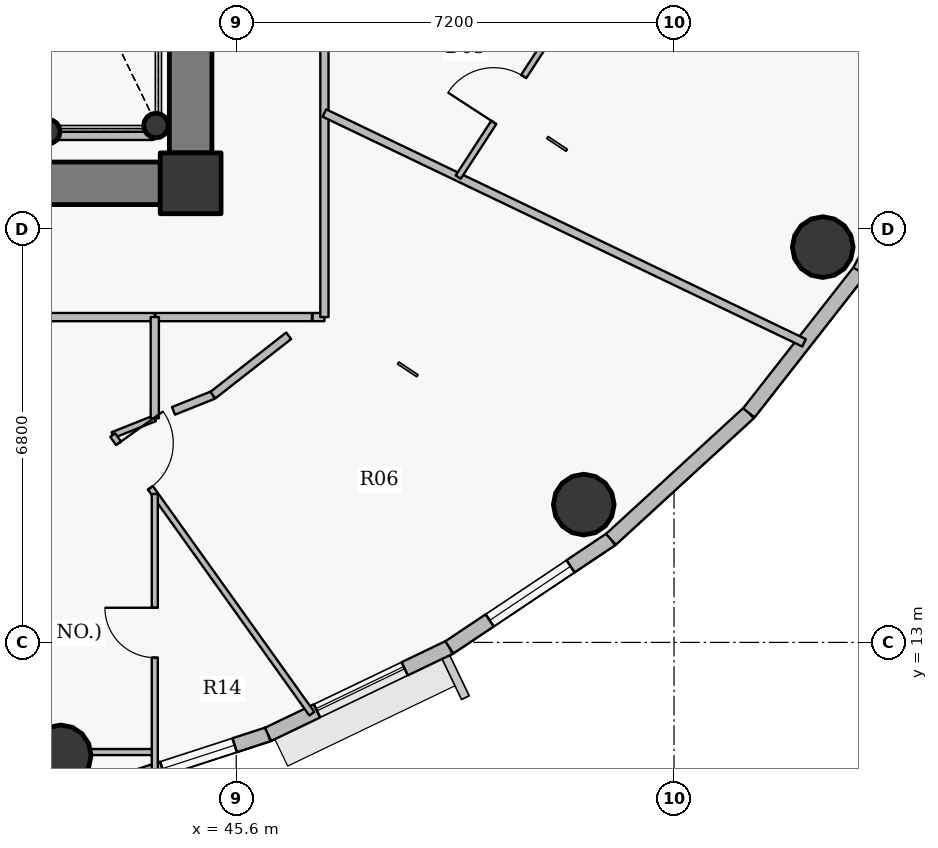
"""IFC4 building model, lengths in metres.
Left out: names, types, materials, properties, quantities, classifications, styles, units other than length and angle.
Written with IfcOpenShell. Run it as: python <this file> out.ifc"""

import sys

from ifc_helpers import new_model, si_unit, direction, frame, frame_2d, origin, origin_2d, place, context, subcontext, project, spatial, rectangle, hollow_circle, extrude, source, transform, mapped, element, fill, save


model = new_model("IFC4")
c1 = context("Model", 3, precision=1e-05, world=origin(), true_north=direction((0.0, 1.0)))
c2 = subcontext(c1, "Body", "Model", "MODEL_VIEW")
j1 = project(units=[si_unit("LENGTHUNIT", "METRE"), si_unit("PLANEANGLEUNIT", "RADIAN")], contexts=[c1])
p1 = place(None, origin())
s1 = spatial("IfcSite", under=j1, at=p1, CompositionType="ELEMENT")
p2 = place(p1, origin())
s2 = spatial("IfcBuilding", under=s1, at=p2, CompositionType="ELEMENT")
p3 = place(p2, frame((0.0, 0.0, 310.5)))
s3 = spatial("IfcBuildingStorey", under=s2, at=p3, CompositionType="ELEMENT", Elevation=310.5)
p4 = place(p3, frame((44.85, 20.55, 0.0), z_axis=(0.0, 0.0, 1.0), x_axis=(1.0, 0.0, 0.0)))
e1 = element("IfcColumn", 1, at=p4, inside=s3, PredefinedType="COLUMN", context=c2, shape_type="SweptSolid", body=[
    extrude(rectangle(XDim=1.0, YDim=1.0, at=origin_2d()), origin(), (0.0, 0.0, 1.0), 3.75),
])
for number, where, z_axis, x_axis in (
    (2, (44.28, 21.5, 0.0), (0.0, 0.0, 1.0), (1.0, 0.0, 0.0)),
    (3, (42.5, 21.4, 0.0), (0.0, 0.0, 1.0), (1.0, 0.0, 0.0)),
):
    element("IfcColumn", number, at=place(p3, frame(where, z_axis=z_axis, x_axis=x_axis)), inside=s3, PredefinedType="COLUMN", context=c2, shape_type="SweptSolid", body=[
        extrude(hollow_circle(Radius=0.203, WallThickness=0.016, at=origin_2d()), origin(), (0.0, 0.0, 1.0), 3.75),
    ])
p5 = place(p3, frame((44.85, 32.95, 0.0), z_axis=(0.0, 0.0, 1.0), x_axis=(0.0, -1.0, 0.0)))
e4 = element("IfcWall", 4, at=p5, inside=s3, PredefinedType="SHEAR", context=c2, shape_type="SweptSolid", body=[
    extrude(rectangle(XDim=11.9, YDim=0.7, at=frame_2d((5.95, 0.0))), origin(), (0.0, 0.0, 1.0), 3.05),
])
p6 = place(p3, frame((44.35, 20.55, 0.0), z_axis=(0.0, 0.0, 1.0), x_axis=(-1.0, 0.0, 0.0)))
e5 = element("IfcWall", 5, at=p6, inside=s3, PredefinedType="SHEAR", context=c2, shape_type="SweptSolid", body=[
    extrude(rectangle(XDim=16.7, YDim=0.7, at=frame_2d((8.35, 0.0))), origin(), (0.0, 0.0, 1.0), 3.05),
])
p7 = place(p6, frame((12.925, 0.0, 0.0)))
e6 = element("IfcOpeningElement", 6, at=p7, cuts=e5, PredefinedType="OPENING", context=c2, shape_type="SweptSolid", body=[
    extrude(rectangle(XDim=1.15, YDim=2.15, at=origin_2d()), frame((0.575, 0.36, 1.075), z_axis=(0.0, -1.0, 0.0), x_axis=(1.0, 0.0, 0.0)), (0.0, 0.0, 1.0), 0.72),
])
p8 = place(p6, frame((9.1, 0.0, 0.0)))
e7 = element("IfcOpeningElement", 7, at=p8, cuts=e5, PredefinedType="OPENING", context=c2, shape_type="SweptSolid", body=[
    extrude(rectangle(XDim=1.15, YDim=2.15, at=origin_2d()), frame((0.575, 0.36, 1.075), z_axis=(0.0, -1.0, 0.0), x_axis=(1.0, 0.0, 0.0)), (0.0, 0.0, 1.0), 0.72),
])
for number, where, z_axis, x_axis in (
    (8, (42.712, 11.142, 0.0), (0.0, 0.0, 1.0), (1.0, 0.0, 0.0)),
    (9, (51.315, 15.267, 0.0), (0.0, 0.0, 1.0), (1.0, 0.0, 0.0)),
    (10, (55.246, 19.5, 0.0), (0.0, 0.0, 1.0), (1.0, 0.0, 0.0)),
):
    element("IfcColumn", number, at=place(p3, frame(where, z_axis=z_axis, x_axis=x_axis)), inside=s3, PredefinedType="COLUMN", context=c2, shape_type="SweptSolid", body=[
        extrude(hollow_circle(Radius=0.5, WallThickness=0.032, at=origin_2d()), origin(), (0.0, 0.0, 1.0), 3.75),
    ])
p9 = place(p3, frame((46.123, 11.488, 0.0), z_axis=(0.0, 0.0, 1.0), x_axis=(-0.95123136723, -0.308478339592, 0.0)))
e11 = element("IfcWall", 11, at=p9, inside=s3, PredefinedType="SOLIDWALL", context=c2, shape_type="SweptSolid", body=[
    extrude(rectangle(XDim=3.398, YDim=0.24, at=frame_2d((1.699, 0.0))), origin(), (0.0, 0.0, 1.0), 3.5),
])
p10 = place(p9, frame((0.577, 0.0, 0.9)))
e12 = element("IfcOpeningElement", 12, at=p10, cuts=e11, PredefinedType="OPENING", context=c2, shape_type="SweptSolid", body=[
    extrude(rectangle(XDim=1.25, YDim=1.65, at=origin_2d()), frame((0.625, 0.13, 0.825), z_axis=(0.0, -1.0, 0.0), x_axis=(1.0, 0.0, 0.0)), (0.0, 0.0, 1.0), 0.26),
])
p11 = place(p3, frame((49.104, 12.918, 0.0), z_axis=(0.0, 0.0, 1.0), x_axis=(-0.901573741254, -0.43262546051, 0.0)))
e13 = element("IfcWall", 13, at=p11, inside=s3, PredefinedType="SOLIDWALL", context=c2, shape_type="SweptSolid", body=[
    extrude(rectangle(XDim=3.307, YDim=0.24, at=frame_2d((1.653, 0.0))), origin(), (0.0, 0.0, 1.0), 3.5),
])
p12 = place(p11, frame((0.814, 0.0, 0.9)))
e14 = element("IfcOpeningElement", 14, at=p12, cuts=e13, PredefinedType="OPENING", context=c2, shape_type="SweptSolid", body=[
    extrude(rectangle(XDim=1.6, YDim=1.75, at=origin_2d()), frame((0.8, 0.13, 0.875), z_axis=(0.0, -1.0, 0.0), x_axis=(1.0, 0.0, 0.0)), (0.0, 0.0, 1.0), 0.26),
])
p13 = place(p3, frame((51.762, 14.696, 0.0), z_axis=(0.0, 0.0, 1.0), x_axis=(-0.831250592635, -0.55589787933, 0.0)))
e15 = element("IfcWall", 15, at=p13, inside=s3, PredefinedType="SOLIDWALL", context=c2, shape_type="SweptSolid", body=[
    extrude(rectangle(XDim=3.197, YDim=0.24, at=frame_2d((1.599, 0.0))), origin(), (0.0, 0.0, 1.0), 3.5),
])
p14 = place(p13, frame((0.799, 0.0, 0.9)))
e16 = element("IfcOpeningElement", 16, at=p14, cuts=e15, PredefinedType="OPENING", context=c2, shape_type="SweptSolid", body=[
    extrude(rectangle(XDim=1.6, YDim=1.75, at=origin_2d()), frame((0.8, 0.13, 0.875), z_axis=(0.0, -1.0, 0.0), x_axis=(1.0, 0.0, 0.0)), (0.0, 0.0, 1.0), 0.26),
])
p15 = place(p3, frame((54.03, 16.775, 0.0), z_axis=(0.0, 0.0, 1.0), x_axis=(-0.737068506972, -0.675818034703, 0.0)))
e17 = element("IfcWall", 17, at=p15, inside=s3, PredefinedType="SOLIDWALL", context=c2, shape_type="SweptSolid", body=[
    extrude(rectangle(XDim=3.077, YDim=0.24, at=frame_2d((1.539, 0.0))), origin(), (0.0, 0.0, 1.0), 3.5),
])
p16 = place(p3, frame((55.854, 19.105, 0.0), z_axis=(0.0, 0.0, 1.0), x_axis=(-0.616337186556, -0.787482363275, 0.0)))
e18 = element("IfcWall", 18, at=p16, inside=s3, PredefinedType="SOLIDWALL", context=c2, shape_type="SweptSolid", body=[
    extrude(rectangle(XDim=2.958, YDim=0.24, at=frame_2d((1.479, 0.0))), origin(), (0.0, 0.0, 1.0), 3.5),
])
p17 = place(p3, frame((57.188, 21.628, 0.0), z_axis=(0.0, 0.0, 1.0), x_axis=(-0.467628269026, -0.883925224218, 0.0)))
e19 = element("IfcWall", 19, at=p17, inside=s3, PredefinedType="SOLIDWALL", context=c2, shape_type="SweptSolid", body=[
    extrude(rectangle(XDim=2.854, YDim=0.24, at=frame_2d((1.427, 0.0))), origin(), (0.0, 0.0, 1.0), 3.5),
])
p18 = place(p3, frame((24.95, 18.35, 0.0), z_axis=(0.0, 0.0, 1.0), x_axis=(1.0, 0.0, 0.0)))
e20 = element("IfcWall", 20, at=p18, inside=s3, PredefinedType="PARTITIONING", context=c2, shape_type="SweptSolid", body=[
    extrude(rectangle(XDim=19.311, YDim=0.135, at=frame_2d((9.655, 0.0))), origin(), (0.0, 0.0, 1.0), 3.035),
])
p19 = place(p18, frame((9.319, 0.0, 0.0)))
e21 = element("IfcOpeningElement", 21, at=p19, cuts=e20, PredefinedType="OPENING", context=c2, shape_type="SweptSolid", body=[
    extrude(rectangle(XDim=1.0, YDim=2.15, at=origin_2d()), frame((0.5, 0.078, 1.075), z_axis=(0.0, -1.0, 0.0), x_axis=(1.0, 0.0, 0.0)), (0.0, 0.0, 1.0), 0.155),
])
p20 = place(p3, frame((37.857, 11.197, 0.0), z_axis=(0.0, 0.0, 1.0), x_axis=(1.0, 0.0, 0.0)))
e22 = element("IfcWall", 22, at=p20, inside=s3, PredefinedType="PARTITIONING", context=c2, shape_type="SweptSolid", body=[
    extrude(rectangle(XDim=6.404, YDim=0.1, at=frame_2d((3.202, 0.0))), origin(), (0.0, 0.0, 1.0), 2.985),
])
p21 = place(p20, frame((1.962, 0.0, 0.0)))
e23 = element("IfcOpeningElement", 23, at=p21, cuts=e22, PredefinedType="OPENING", context=c2, shape_type="SweptSolid", body=[
    extrude(rectangle(XDim=0.9, YDim=2.1, at=origin_2d()), frame((0.45, 0.06, 1.05), z_axis=(0.0, -1.0, 0.0), x_axis=(1.0, 0.0, 0.0)), (0.0, 0.0, 1.0), 0.12),
])
p22 = place(p3, frame((43.568, 16.409, 0.0), z_axis=(0.0, 0.0, 1.0), x_axis=(0.928815226083, 0.370543217178, 0.0)))
e24 = element("IfcWall", 24, at=p22, inside=s3, PredefinedType="PARTITIONING", context=c2, shape_type="SweptSolid", body=[
    extrude(rectangle(XDim=0.745, YDim=0.1, at=frame_2d((0.373, 0.0))), origin(), (0.0, 0.0, 1.0), 3.5),
])
p23 = place(p3, frame((43.568, 16.409, 0.0), z_axis=(0.0, 0.0, 1.0), x_axis=(0.581447306737, -0.81358406418, 0.0)))
e25 = element("IfcWall", 25, at=p23, inside=s3, PredefinedType="PARTITIONING", context=c2, shape_type="SweptSolid", body=[
    extrude(rectangle(XDim=5.632, YDim=0.1, at=frame_2d((2.816, 0.0))), origin(), (0.0, 0.0, 1.0), 2.985),
])
p24 = place(p23, frame((0.165, 0.0, 0.0)))
e26 = element("IfcOpeningElement", 26, at=p24, cuts=e25, PredefinedType="OPENING", context=c2, shape_type="SweptSolid", body=[
    extrude(rectangle(XDim=0.9, YDim=2.1, at=origin_2d()), frame((0.45, 0.06, 1.05), z_axis=(0.0, -1.0, 0.0), x_axis=(1.0, 0.0, 0.0)), (0.0, 0.0, 1.0), 0.12),
])
p25 = place(p3, frame((44.26, 10.878, 0.0), z_axis=(0.0, 0.0, 1.0), x_axis=(0.0, 1.0, 0.0)))
e27 = element("IfcWall", 27, at=p25, inside=s3, PredefinedType="PARTITIONING", context=c2, shape_type="SweptSolid", body=[
    extrude(rectangle(XDim=4.563, YDim=0.1, at=frame_2d((2.281, 0.0))), origin(), (0.0, 0.0, 1.0), 2.985),
])
p26 = place(p25, frame((1.871, 0.0, 0.0)))
e28 = element("IfcOpeningElement", 28, at=p26, cuts=e27, PredefinedType="OPENING", context=c2, shape_type="SweptSolid", body=[
    extrude(rectangle(XDim=0.82, YDim=2.1, at=origin_2d()), frame((0.41, 0.06, 1.05), z_axis=(0.0, -1.0, 0.0), x_axis=(1.0, 0.0, 0.0)), (0.0, 0.0, 1.0), 0.12),
])
p27 = place(p3, frame((46.855, 18.35, 0.0), z_axis=(0.0, 0.0, 1.0), x_axis=(1.0, 0.0, 0.0)))
e29 = element("IfcWall", 29, at=p27, inside=s3, PredefinedType="PARTITIONING", context=c2, shape_type="SweptSolid", body=[
    extrude(rectangle(XDim=0.195, YDim=0.135, at=frame_2d((0.097, 0.0))), origin(), (0.0, 0.0, 1.0), 3.035),
])
p28 = place(p3, frame((47.05, 18.35, 0.0), z_axis=(0.0, 0.0, 1.0), x_axis=(0.0, 1.0, 0.0)))
e30 = element("IfcWall", 30, at=p28, inside=s3, PredefinedType="PARTITIONING", context=c2, shape_type="SweptSolid", body=[
    extrude(rectangle(XDim=17.3, YDim=0.135, at=frame_2d((8.65, 0.0))), origin(), (0.0, 0.0, 1.0), 3.035),
])
p29 = place(p28, frame((9.808, 0.0, 0.0)))
e31 = element("IfcOpeningElement", 31, at=p29, cuts=e30, PredefinedType="OPENING", context=c2, shape_type="SweptSolid", body=[
    extrude(rectangle(XDim=1.0, YDim=2.15, at=origin_2d()), frame((0.5, 0.078, 1.075), z_axis=(0.0, -1.0, 0.0), x_axis=(1.0, 0.0, 0.0)), (0.0, 0.0, 1.0), 0.155),
])
p30 = place(p3, frame((47.05, 21.706, 0.0), z_axis=(0.0, 0.0, 1.0), x_axis=(0.901842087785, -0.432065792096, 0.0)))
e32 = element("IfcWall", 32, at=p30, inside=s3, PredefinedType="PARTITIONING", context=c2, shape_type="SweptSolid", body=[
    extrude(rectangle(XDim=8.747, YDim=0.135, at=frame_2d((4.373, 0.0))), origin(), (0.0, 0.0, 1.0), 2.985),
])
p31 = place(p3, frame((49.25, 20.652, 0.0), z_axis=(0.0, 0.0, 1.0), x_axis=(0.54545856642, 0.838137788385, 0.0)))
e33 = element("IfcWall", 33, at=p31, inside=s3, PredefinedType="PARTITIONING", context=c2, shape_type="SweptSolid", body=[
    extrude(rectangle(XDim=3.047, YDim=0.1, at=frame_2d((1.523, 0.0))), origin(), (0.0, 0.0, 1.0), 3.035),
])
p32 = place(p31, frame((1.073, 0.0, 0.0)))
e34 = element("IfcOpeningElement", 34, at=p32, cuts=e33, PredefinedType="OPENING", context=c2, shape_type="SweptSolid", body=[
    extrude(rectangle(XDim=0.9, YDim=2.1, at=origin_2d()), frame((0.45, 0.06, 1.05), z_axis=(0.0, -1.0, 0.0), x_axis=(1.0, 0.0, 0.0)), (0.0, 0.0, 1.0), 0.12),
])
p33 = place(p3, frame((44.24, 21.33, 0.0), z_axis=(0.0, 0.0, 1.0), x_axis=(-1.0, 0.0, 0.0)))
e35 = element("IfcWall", 35, at=p33, inside=s3, PredefinedType="PARTITIONING", context=c2, shape_type="SweptSolid", body=[
    extrude(rectangle(XDim=2.98, YDim=0.135, at=frame_2d((1.49, 0.0))), origin(), (0.0, 0.0, 1.0), 3.035),
])
p34 = place(p3, frame((46.845, 18.35, 0.0), z_axis=(0.0, 0.0, 1.0), x_axis=(-1.0, 0.0, 0.0)))
e36 = element("IfcWall", 36, at=p34, inside=s3, PredefinedType="PARTITIONING", context=c2, shape_type="SweptSolid", body=[
    extrude(rectangle(XDim=2.575, YDim=0.135, at=frame_2d((1.287, 0.0))), origin(), (0.0, 0.0, 1.0), 3.5),
])
p35 = place(p3, frame((44.36, 20.2, 0.0), z_axis=(0.0, 0.0, 1.0), x_axis=(1.0, 0.0, 0.0)))
e37 = element("IfcWall", 37, at=p35, inside=s3, PredefinedType="PARTITIONING", context=c2, shape_type="SweptSolid", body=[
    extrude(rectangle(XDim=0.84, YDim=0.135, at=frame_2d((0.42, 0.0))), origin(), (0.0, 0.0, 1.0), 3.035),
])
p36 = place(p3, frame((45.2, 20.508, 0.0), z_axis=(0.0, 0.0, 1.0), x_axis=(0.0, 1.0, 0.0)))
e38 = element("IfcWall", 38, at=p36, inside=s3, PredefinedType="PARTITIONING", context=c2, shape_type="SweptSolid", body=[
    extrude(rectangle(XDim=0.532, YDim=0.135, at=frame_2d((0.266, 0.0))), origin(), (0.0, 0.0, 1.0), 3.5),
])
p37 = place(p3, frame((44.26, 18.35, 0.0), z_axis=(0.0, 0.0, 1.0), x_axis=(0.0, -1.0, 0.0)))
e39 = element("IfcWall", 39, at=p37, inside=s3, PredefinedType="PARTITIONING", context=c2, shape_type="SweptSolid", body=[
    extrude(rectangle(XDim=1.665, YDim=0.135, at=frame_2d((0.832, 0.0))), origin(), (0.0, 0.0, 1.0), 3.5),
])
p38 = place(p3, frame((44.568, 16.808, 0.0), z_axis=(0.0, 0.0, 1.0), x_axis=(0.928813825631, 0.370546727576, 0.0)))
e40 = element("IfcWall", 40, at=p38, inside=s3, PredefinedType="PARTITIONING", context=c2, shape_type="SweptSolid", body=[
    extrude(rectangle(XDim=0.698, YDim=0.135, at=frame_2d((0.349, 0.0))), origin(), (0.0, 0.0, 1.0), 3.5),
])
p39 = place(p3, frame((45.217, 17.067, 0.0), z_axis=(0.0, 0.0, 1.0), x_axis=(0.787329157173, 0.616532884982, 0.0)))
e41 = element("IfcWall", 41, at=p39, inside=s3, PredefinedType="PARTITIONING", context=c2, shape_type="SweptSolid", body=[
    extrude(rectangle(XDim=1.582, YDim=0.135, at=frame_2d((0.791, 0.0))), origin(), (0.0, 0.0, 1.0), 3.5),
])
m1 = source(origin(), c2, "Body", "SweptSolid", [
    extrude(rectangle(XDim=1.6, YDim=1.75, at=origin_2d()), frame((0.8, 0.03, 0.875), z_axis=(0.0, -1.0, 0.0), x_axis=(1.0, 0.0, 0.0)), (0.0, 0.0, 1.0), 0.06),
])
p40 = place(p12, origin())
e42 = element("IfcWindow", 42, at=p40, inside=s3, PartitioningType="DOUBLE_PANEL_VERTICAL", PredefinedType="WINDOW", context=c2, shape_type="MappedRepresentation", body=[
    mapped(m1, transform((0.0, 0.0, 0.0), x_axis=(1.0, 0.0, 0.0), y_axis=(0.0, 1.0, 0.0), z_axis=(0.0, 0.0, 1.0), scale=1.0)),
])
fill(e14, e42)
p41 = place(p14, origin())
e43 = element("IfcWindow", 43, at=p41, inside=s3, PartitioningType="DOUBLE_PANEL_VERTICAL", PredefinedType="WINDOW", context=c2, shape_type="MappedRepresentation", body=[
    mapped(m1, transform((0.0, 0.0, 0.0), x_axis=(1.0, 0.0, 0.0), y_axis=(0.0, 1.0, 0.0), z_axis=(0.0, 0.0, 1.0), scale=1.0)),
])
fill(e16, e43)
m2 = source(origin(), c2, "Body", "SweptSolid", [
    extrude(rectangle(XDim=1.25, YDim=1.65, at=origin_2d()), frame((0.625, 0.03, 0.825), z_axis=(0.0, -1.0, 0.0), x_axis=(1.0, 0.0, 0.0)), (0.0, 0.0, 1.0), 0.06),
])
p42 = place(p10, origin())
e44 = element("IfcWindow", 44, at=p42, inside=s3, PartitioningType="SINGLE_PANEL", PredefinedType="WINDOW", context=c2, shape_type="MappedRepresentation", body=[
    mapped(m2, transform((0.0, 0.0, 0.0), x_axis=(1.0, 0.0, 0.0), y_axis=(0.0, 1.0, 0.0), z_axis=(0.0, 0.0, 1.0), scale=1.0)),
])
fill(e12, e44)
m3 = source(origin(), c2, "Body", "SweptSolid", [
    extrude(rectangle(XDim=0.9, YDim=2.1, at=origin_2d()), frame((0.45, 0.025, 1.05), z_axis=(0.0, -1.0, 0.0), x_axis=(1.0, 0.0, 0.0)), (0.0, 0.0, 1.0), 0.05),
])
p43 = place(p24, origin())
e45 = element("IfcDoor", 45, at=p43, inside=s3, OperationType="SINGLE_SWING_LEFT", PredefinedType="DOOR", context=c2, shape_type="MappedRepresentation", body=[
    mapped(m3, transform((0.0, 0.0, 0.0), x_axis=(1.0, 0.0, 0.0), y_axis=(0.0, 1.0, 0.0), z_axis=(0.0, 0.0, 1.0), scale=1.0)),
])
fill(e26, e45)
m4 = source(origin(), c2, "Body", "SweptSolid", [
    extrude(rectangle(XDim=0.82, YDim=2.1, at=origin_2d()), frame((0.41, 0.025, 1.05), z_axis=(0.0, -1.0, 0.0), x_axis=(1.0, 0.0, 0.0)), (0.0, 0.0, 1.0), 0.05),
])
p44 = place(p26, origin())
e46 = element("IfcDoor", 46, at=p44, inside=s3, OperationType="SINGLE_SWING_RIGHT", PredefinedType="DOOR", context=c2, shape_type="MappedRepresentation", body=[
    mapped(m4, transform((0.0, 0.0, 0.0), x_axis=(1.0, 0.0, 0.0), y_axis=(0.0, 1.0, 0.0), z_axis=(0.0, 0.0, 1.0), scale=1.0)),
])
fill(e28, e46)
p45 = place(p32, origin())
e47 = element("IfcDoor", 47, at=p45, inside=s3, OperationType="SINGLE_SWING_LEFT", PredefinedType="DOOR", context=c2, shape_type="MappedRepresentation", body=[
    mapped(m3, transform((0.0, 0.0, 0.0), x_axis=(1.0, 0.0, 0.0), y_axis=(0.0, 1.0, 0.0), z_axis=(0.0, 0.0, 1.0), scale=1.0)),
])
fill(e34, e47)
save(model, sys.argv[1])
